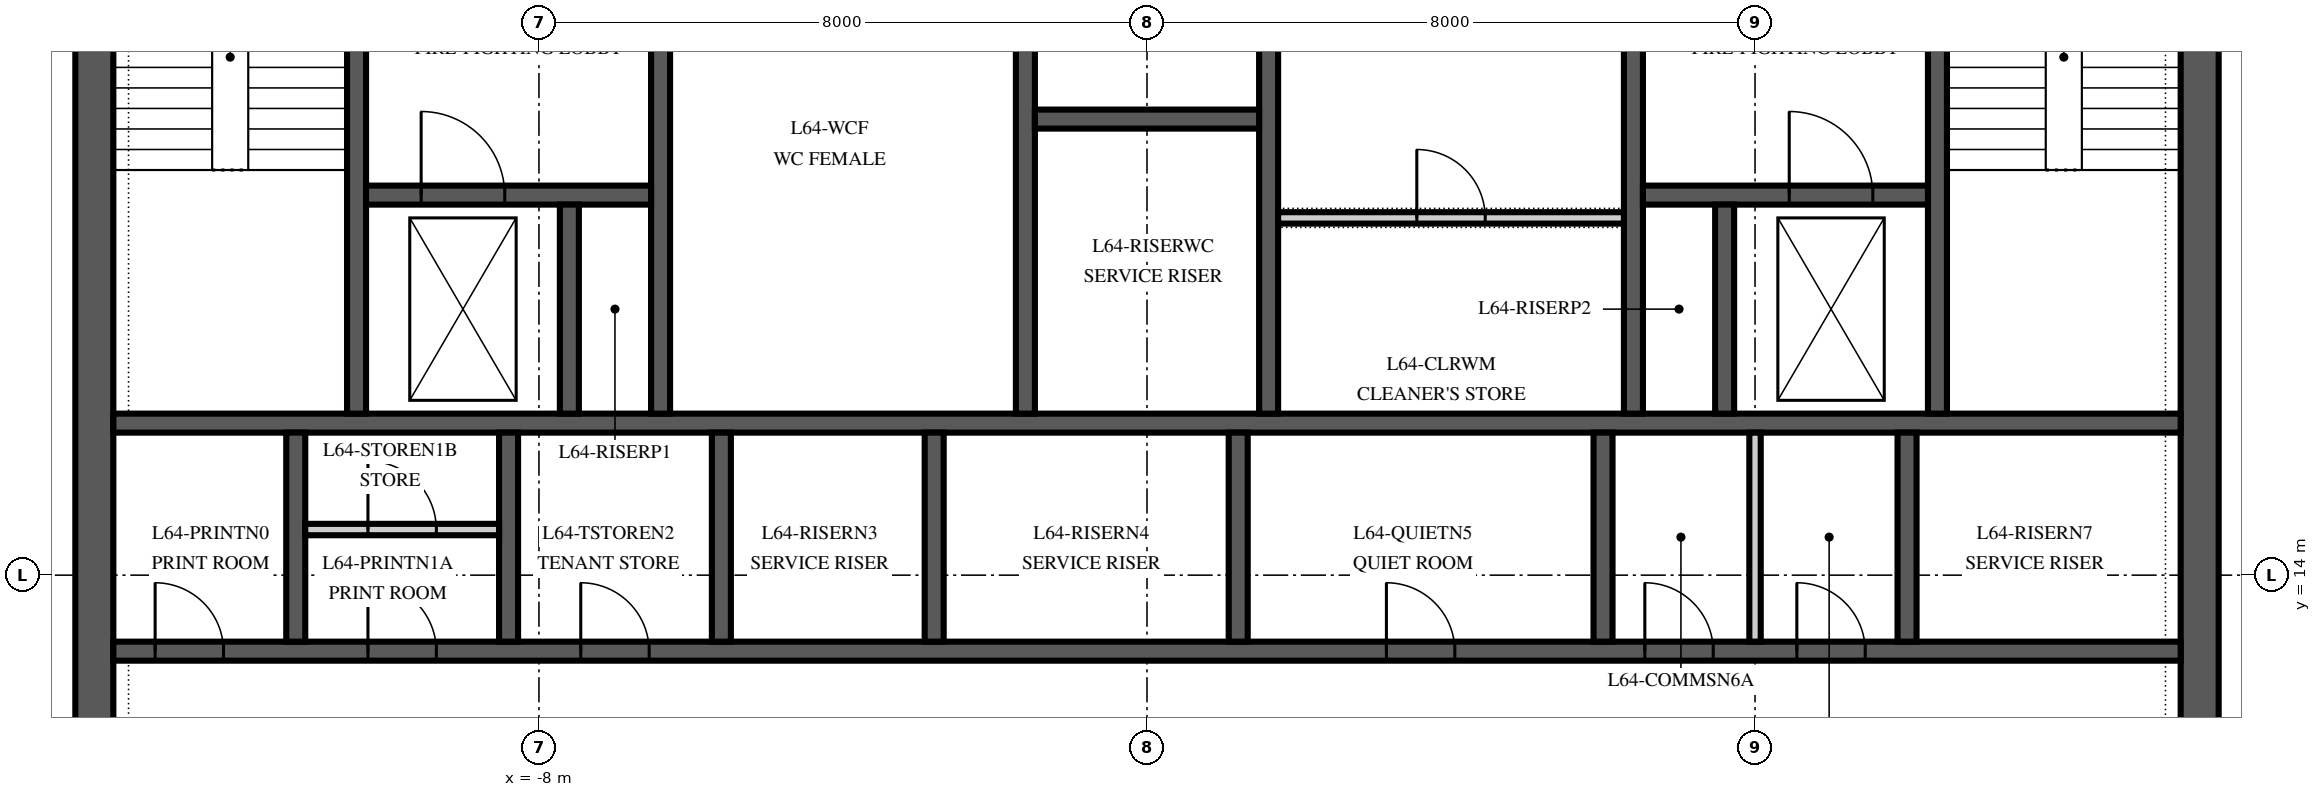
"""IFC4 building model, lengths in metres.
Left out: names, types, materials, properties, quantities, classifications, styles, units other than length and angle.
Written with IfcOpenShell. Run it as: python <this file> out.ifc"""

import sys

from ifc_helpers import new_model, si_unit, direction, frame, frame_2d, origin, place, context, subcontext, project, spatial, polyline, rectangle, outline, extrude, element, fill, save


model = new_model("IFC4")
c1 = context("Model", 3, precision=1e-05, world=origin(), true_north=direction((0.0, 1.0)))
c2 = subcontext(c1, "Body", "Model", "MODEL_VIEW")
j1 = project(units=[si_unit("LENGTHUNIT", "METRE"), si_unit("PLANEANGLEUNIT", "RADIAN")], contexts=[c1])
p1 = place(None, origin())
s1 = spatial("IfcSite", under=j1, at=p1, CompositionType="ELEMENT")
p2 = place(p1, origin())
s2 = spatial("IfcBuilding", under=s1, at=p2, CompositionType="ELEMENT")
p3 = place(p2, frame((0.0, 0.0, 276.0)))
s3 = spatial("IfcBuildingStorey", under=s2, at=p3, CompositionType="ELEMENT", Elevation=276.0)
p4 = place(p3, frame((13.85, 6.15, 0.0), z_axis=(0.0, 0.0, 1.0), x_axis=(0.0, 1.0, 0.0)))
e1 = element("IfcWall", 1, at=p4, inside=s3, PredefinedType="SHEAR", context=c2, shape_type="SweptSolid", body=[
    extrude(outline(polyline([(0.0, -0.25), (17.7, -0.25), (17.7, 0.0), (17.45, 0.0), (17.45, 0.25), (0.25, 0.25), (0.25, 0.0), (0.0, 0.0), (0.0, -0.25)])), origin(), (0.0, 0.0, 1.0), 4.0),
])
p5 = place(p4, frame((4.15, 0.0, 0.0)))
e2 = element("IfcOpeningElement", 2, at=p5, cuts=e1, PredefinedType="OPENING", context=c2, shape_type="SweptSolid", body=[
    extrude(rectangle(XDim=1.8, YDim=2.4, at=frame_2d((0.9, 1.2))), frame((0.0, 0.265, 0.0), z_axis=(0.0, -1.0, 0.0), x_axis=(1.0, 0.0, 0.0)), (0.0, 0.0, 1.0), 0.53),
])
p6 = place(p3, frame((-13.85, 23.85, 0.0), z_axis=(0.0, 0.0, 1.0), x_axis=(0.0, -1.0, 0.0)))
e3 = element("IfcWall", 3, at=p6, inside=s3, PredefinedType="SHEAR", context=c2, shape_type="SweptSolid", body=[
    extrude(outline(polyline([(0.0, -0.25), (17.7, -0.25), (17.7, 0.0), (17.45, 0.0), (17.45, 0.25), (0.25, 0.25), (0.25, 0.0), (0.0, 0.0), (0.0, -0.25)])), origin(), (0.0, 0.0, 1.0), 4.0),
])
p7 = place(p6, frame((11.75, 0.0, 0.0)))
e4 = element("IfcOpeningElement", 4, at=p7, cuts=e3, PredefinedType="OPENING", context=c2, shape_type="SweptSolid", body=[
    extrude(rectangle(XDim=1.8, YDim=2.4, at=frame_2d((0.9, 1.2))), frame((0.0, 0.265, 0.0), z_axis=(0.0, -1.0, 0.0), x_axis=(1.0, 0.0, 0.0)), (0.0, 0.0, 1.0), 0.53),
])
p8 = place(p3, frame((-13.6, 13.0, 0.0), z_axis=(0.0, 0.0, 1.0), x_axis=(1.0, 0.0, 0.0)))
e5 = element("IfcWall", 5, at=p8, inside=s3, PredefinedType="SHEAR", context=c2, shape_type="SweptSolid", body=[
    extrude(rectangle(XDim=27.2, YDim=0.25, at=frame_2d((13.6, 0.0))), origin(), (0.0, 0.0, 1.0), 4.0),
])
p9 = place(p8, frame((16.75, 0.0, 0.0)))
e6 = element("IfcOpeningElement", 6, at=p9, cuts=e5, PredefinedType="OPENING", context=c2, shape_type="SweptSolid", body=[
    extrude(rectangle(XDim=0.9, YDim=2.1, at=frame_2d((0.45, 1.05))), frame((0.0, 0.14, 0.0), z_axis=(0.0, -1.0, 0.0), x_axis=(1.0, 0.0, 0.0)), (0.0, 0.0, 1.0), 0.28),
])
p10 = place(p8, frame((20.15, 0.0, 0.0)))
e7 = element("IfcOpeningElement", 7, at=p10, cuts=e5, PredefinedType="OPENING", context=c2, shape_type="SweptSolid", body=[
    extrude(rectangle(XDim=0.9, YDim=2.1, at=frame_2d((0.45, 1.05))), frame((0.0, 0.14, 0.0), z_axis=(0.0, -1.0, 0.0), x_axis=(1.0, 0.0, 0.0)), (0.0, 0.0, 1.0), 0.28),
])
p11 = place(p8, frame((22.15, 0.0, 0.0)))
e8 = element("IfcOpeningElement", 8, at=p11, cuts=e5, PredefinedType="OPENING", context=c2, shape_type="SweptSolid", body=[
    extrude(rectangle(XDim=0.9, YDim=2.1, at=frame_2d((0.45, 1.05))), frame((0.0, 0.14, 0.0), z_axis=(0.0, -1.0, 0.0), x_axis=(1.0, 0.0, 0.0)), (0.0, 0.0, 1.0), 0.28),
])
p12 = place(p8, frame((0.55, 0.0, 0.0)))
e9 = element("IfcOpeningElement", 9, at=p12, cuts=e5, PredefinedType="OPENING", context=c2, shape_type="SweptSolid", body=[
    extrude(rectangle(XDim=0.9, YDim=2.1, at=frame_2d((0.45, 1.05))), frame((0.0, 0.14, 0.0), z_axis=(0.0, -1.0, 0.0), x_axis=(1.0, 0.0, 0.0)), (0.0, 0.0, 1.0), 0.28),
])
p13 = place(p8, frame((3.35, 0.0, 0.0)))
e10 = element("IfcOpeningElement", 10, at=p13, cuts=e5, PredefinedType="OPENING", context=c2, shape_type="SweptSolid", body=[
    extrude(rectangle(XDim=0.9, YDim=2.1, at=frame_2d((0.45, 1.05))), frame((0.0, 0.14, 0.0), z_axis=(0.0, -1.0, 0.0), x_axis=(1.0, 0.0, 0.0)), (0.0, 0.0, 1.0), 0.28),
])
p14 = place(p8, frame((6.15, 0.0, 0.0)))
e11 = element("IfcOpeningElement", 11, at=p14, cuts=e5, PredefinedType="OPENING", context=c2, shape_type="SweptSolid", body=[
    extrude(rectangle(XDim=0.9, YDim=2.1, at=frame_2d((0.45, 1.05))), frame((0.0, 0.14, 0.0), z_axis=(0.0, -1.0, 0.0), x_axis=(1.0, 0.0, 0.0)), (0.0, 0.0, 1.0), 0.28),
])
p15 = place(p3, frame((-13.6, 16.0, 0.0), z_axis=(0.0, 0.0, 1.0), x_axis=(1.0, 0.0, 0.0)))
e12 = element("IfcWall", 12, at=p15, inside=s3, PredefinedType="SHEAR", context=c2, shape_type="SweptSolid", body=[
    extrude(rectangle(XDim=27.2, YDim=0.25, at=frame_2d((13.6, 0.0))), origin(), (0.0, 0.0, 1.0), 4.0),
])
for number, where, z_axis, x_axis in (
    (13, (-11.2, 13.125, 0.0), (0.0, 0.0, 1.0), (0.0, 1.0, 0.0)),
    (14, (-8.4, 13.125, 0.0), (0.0, 0.0, 1.0), (0.0, 1.0, 0.0)),
    (15, (-5.6, 13.125, 0.0), (0.0, 0.0, 1.0), (0.0, 1.0, 0.0)),
    (16, (-2.8, 13.125, 0.0), (0.0, 0.0, 1.0), (0.0, 1.0, 0.0)),
    (17, (1.2, 13.125, 0.0), (0.0, 0.0, 1.0), (0.0, 1.0, 0.0)),
    (18, (6.0, 13.125, 0.0), (0.0, 0.0, 1.0), (0.0, 1.0, 0.0)),
    (19, (10.0, 13.125, 0.0), (0.0, 0.0, 1.0), (0.0, 1.0, 0.0)),
):
    element("IfcWall", number, at=place(p3, frame(where, z_axis=z_axis, x_axis=x_axis)), inside=s3, PredefinedType="SHEAR", context=c2, shape_type="SweptSolid", body=[
        extrude(rectangle(XDim=2.75, YDim=0.25, at=frame_2d((1.375, 0.0))), origin(), (0.0, 0.0, 1.0), 4.0),
    ])
p16 = place(p3, frame((-10.4, 16.125, 0.0), z_axis=(0.0, 0.0, 1.0), x_axis=(0.0, 1.0, 0.0)))
e20 = element("IfcWall", 20, at=p16, inside=s3, PredefinedType="SHEAR", context=c2, shape_type="SweptSolid", body=[
    extrude(rectangle(XDim=7.475, YDim=0.25, at=frame_2d((3.738, 0.0))), origin(), (0.0, 0.0, 1.0), 4.0),
])
p17 = place(p16, frame((6.275, 0.0, 0.0)))
e21 = element("IfcOpeningElement", 21, at=p17, cuts=e20, PredefinedType="OPENING", context=c2, shape_type="SweptSolid", body=[
    extrude(rectangle(XDim=1.0, YDim=2.1, at=frame_2d((0.5, 1.05))), frame((0.0, 0.14, 0.0), z_axis=(0.0, -1.0, 0.0), x_axis=(1.0, 0.0, 0.0)), (0.0, 0.0, 1.0), 0.28),
])
for number, where, z_axis, x_axis in (
    (22, (-6.4, 16.125, 0.0), (0.0, 0.0, 1.0), (0.0, 1.0, 0.0)),
    (23, (-1.6, 16.125, 0.0), (0.0, 0.0, 1.0), (0.0, 1.0, 0.0)),
    (24, (1.6, 16.125, 0.0), (0.0, 0.0, 1.0), (0.0, 1.0, 0.0)),
    (25, (6.4, 16.125, 0.0), (0.0, 0.0, 1.0), (0.0, 1.0, 0.0)),
):
    element("IfcWall", number, at=place(p3, frame(where, z_axis=z_axis, x_axis=x_axis)), inside=s3, PredefinedType="SHEAR", context=c2, shape_type="SweptSolid", body=[
        extrude(rectangle(XDim=7.475, YDim=0.25, at=frame_2d((3.738, 0.0))), origin(), (0.0, 0.0, 1.0), 4.0),
    ])
p18 = place(p3, frame((10.4, 16.125, 0.0), z_axis=(0.0, 0.0, 1.0), x_axis=(0.0, 1.0, 0.0)))
e26 = element("IfcWall", 26, at=p18, inside=s3, PredefinedType="SHEAR", context=c2, shape_type="SweptSolid", body=[
    extrude(rectangle(XDim=7.475, YDim=0.25, at=frame_2d((3.738, 0.0))), origin(), (0.0, 0.0, 1.0), 4.0),
])
p19 = place(p18, frame((6.275, 0.0, 0.0)))
e27 = element("IfcOpeningElement", 27, at=p19, cuts=e26, PredefinedType="OPENING", context=c2, shape_type="SweptSolid", body=[
    extrude(rectangle(XDim=1.0, YDim=2.1, at=frame_2d((0.5, 1.05))), frame((0.0, 0.14, 0.0), z_axis=(0.0, -1.0, 0.0), x_axis=(1.0, 0.0, 0.0)), (0.0, 0.0, 1.0), 0.28),
])
p20 = place(p3, frame((-10.275, 19.0, 0.0), z_axis=(0.0, 0.0, 1.0), x_axis=(1.0, 0.0, 0.0)))
e28 = element("IfcWall", 28, at=p20, inside=s3, PredefinedType="SHEAR", context=c2, shape_type="SweptSolid", body=[
    extrude(rectangle(XDim=3.75, YDim=0.25, at=frame_2d((1.875, 0.0))), origin(), (0.0, 0.0, 1.0), 4.0),
])
p21 = place(p20, frame((0.725, 0.0, 0.0)))
e29 = element("IfcOpeningElement", 29, at=p21, cuts=e28, PredefinedType="OPENING", context=c2, shape_type="SweptSolid", body=[
    extrude(rectangle(XDim=1.1, YDim=2.1, at=frame_2d((0.55, 1.05))), frame((0.0, 0.14, 0.0), z_axis=(0.0, -1.0, 0.0), x_axis=(1.0, 0.0, 0.0)), (0.0, 0.0, 1.0), 0.28),
])
p22 = place(p3, frame((6.525, 19.0, 0.0), z_axis=(0.0, 0.0, 1.0), x_axis=(1.0, 0.0, 0.0)))
e30 = element("IfcWall", 30, at=p22, inside=s3, PredefinedType="SHEAR", context=c2, shape_type="SweptSolid", body=[
    extrude(rectangle(XDim=3.75, YDim=0.25, at=frame_2d((1.875, 0.0))), origin(), (0.0, 0.0, 1.0), 4.0),
])
p23 = place(p22, frame((1.925, 0.0, 0.0)))
e31 = element("IfcOpeningElement", 31, at=p23, cuts=e30, PredefinedType="OPENING", context=c2, shape_type="SweptSolid", body=[
    extrude(rectangle(XDim=1.1, YDim=2.1, at=frame_2d((0.55, 1.05))), frame((0.0, 0.14, 0.0), z_axis=(0.0, -1.0, 0.0), x_axis=(1.0, 0.0, 0.0)), (0.0, 0.0, 1.0), 0.28),
])
for number, where, z_axis, x_axis in (
    (32, (-7.6, 16.125, 0.0), (0.0, 0.0, 1.0), (0.0, 1.0, 0.0)),
    (33, (7.6, 16.125, 0.0), (0.0, 0.0, 1.0), (0.0, 1.0, 0.0)),
):
    element("IfcWall", number, at=place(p3, frame(where, z_axis=z_axis, x_axis=x_axis)), inside=s3, PredefinedType="SHEAR", context=c2, shape_type="SweptSolid", body=[
        extrude(rectangle(XDim=2.75, YDim=0.25, at=frame_2d((1.375, 0.0))), origin(), (0.0, 0.0, 1.0), 4.0),
    ])
p24 = place(p3, frame((-1.475, 20.0, 0.0), z_axis=(0.0, 0.0, 1.0), x_axis=(1.0, 0.0, 0.0)))
e34 = element("IfcWall", 34, at=p24, inside=s3, PredefinedType="SHEAR", context=c2, shape_type="SweptSolid", body=[
    extrude(rectangle(XDim=2.95, YDim=0.25, at=frame_2d((1.475, 0.0))), origin(), (0.0, 0.0, 1.0), 4.0),
])
p25 = place(p3, frame((1.725, 18.7, 0.0), z_axis=(0.0, 0.0, 1.0), x_axis=(1.0, 0.0, 0.0)))
e35 = element("IfcWall", 35, at=p25, inside=s3, PredefinedType="PARTITIONING", context=c2, shape_type="SweptSolid", body=[
    extrude(rectangle(XDim=4.55, YDim=0.15, at=frame_2d((2.275, 0.0))), origin(), (0.0, 0.0, 1.0), 3.85),
])
p26 = place(p25, frame((1.825, 0.0, 0.0)))
e36 = element("IfcOpeningElement", 36, at=p26, cuts=e35, PredefinedType="OPENING", context=c2, shape_type="SweptSolid", body=[
    extrude(rectangle(XDim=0.9, YDim=2.1, at=frame_2d((0.45, 1.05))), frame((0.0, 0.09, 0.0), z_axis=(0.0, -1.0, 0.0), x_axis=(1.0, 0.0, 0.0)), (0.0, 0.0, 1.0), 0.18),
])
p27 = place(p3, frame((8.0, 13.125, 0.0), z_axis=(0.0, 0.0, 1.0), x_axis=(0.0, 1.0, 0.0)))
e37 = element("IfcWall", 37, at=p27, inside=s3, PredefinedType="PARTITIONING", context=c2, shape_type="SweptSolid", body=[
    extrude(rectangle(XDim=2.75, YDim=0.15, at=frame_2d((1.375, 0.0))), origin(), (0.0, 0.0, 1.0), 3.85),
])
p28 = place(p3, frame((-11.075, 14.6, 0.0), z_axis=(0.0, 0.0, 1.0), x_axis=(1.0, 0.0, 0.0)))
e38 = element("IfcWall", 38, at=p28, inside=s3, PredefinedType="PARTITIONING", context=c2, shape_type="SweptSolid", body=[
    extrude(rectangle(XDim=2.55, YDim=0.15, at=frame_2d((1.275, 0.0))), origin(), (0.0, 0.0, 1.0), 3.85),
])
p29 = place(p28, frame((0.825, 0.0, 0.0)))
e39 = element("IfcOpeningElement", 39, at=p29, cuts=e38, PredefinedType="OPENING", context=c2, shape_type="SweptSolid", body=[
    extrude(rectangle(XDim=0.9, YDim=2.1, at=frame_2d((0.45, 1.05))), frame((0.0, 0.09, 0.0), z_axis=(0.0, -1.0, 0.0), x_axis=(1.0, 0.0, 0.0)), (0.0, 0.0, 1.0), 0.18),
])
p30 = place(p23, origin())
e40 = element("IfcDoor", 40, at=p30, inside=s3, OperationType="SLIDING_TO_RIGHT", PredefinedType="DOOR", context=c2, shape_type="SweptSolid", body=[
    extrude(rectangle(XDim=1.1, YDim=2.1, at=frame_2d((0.55, 1.05))), frame((0.0, 0.125, 0.0), z_axis=(0.0, -1.0, 0.0), x_axis=(1.0, 0.0, 0.0)), (0.0, 0.0, 1.0), 0.25),
])
fill(e31, e40)
p31 = place(p21, origin())
e41 = element("IfcDoor", 41, at=p31, inside=s3, OperationType="SLIDING_TO_RIGHT", PredefinedType="DOOR", context=c2, shape_type="SweptSolid", body=[
    extrude(rectangle(XDim=1.1, YDim=2.1, at=frame_2d((0.55, 1.05))), frame((0.0, 0.125, 0.0), z_axis=(0.0, -1.0, 0.0), x_axis=(1.0, 0.0, 0.0)), (0.0, 0.0, 1.0), 0.25),
])
fill(e29, e41)
p32 = place(p9, origin())
e42 = element("IfcDoor", 42, at=p32, inside=s3, OperationType="SINGLE_SWING_LEFT", PredefinedType="DOOR", context=c2, shape_type="SweptSolid", body=[
    extrude(rectangle(XDim=0.9, YDim=2.1, at=frame_2d((0.45, 1.05))), frame((0.0, 0.125, 0.0), z_axis=(0.0, -1.0, 0.0), x_axis=(1.0, 0.0, 0.0)), (0.0, 0.0, 1.0), 0.25),
])
fill(e6, e42)
p33 = place(p10, origin())
e43 = element("IfcDoor", 43, at=p33, inside=s3, OperationType="SINGLE_SWING_LEFT", PredefinedType="DOOR", context=c2, shape_type="SweptSolid", body=[
    extrude(rectangle(XDim=0.9, YDim=2.1, at=frame_2d((0.45, 1.05))), frame((0.0, 0.125, 0.0), z_axis=(0.0, -1.0, 0.0), x_axis=(1.0, 0.0, 0.0)), (0.0, 0.0, 1.0), 0.25),
])
fill(e7, e43)
p34 = place(p11, origin())
e44 = element("IfcDoor", 44, at=p34, inside=s3, OperationType="SINGLE_SWING_LEFT", PredefinedType="DOOR", context=c2, shape_type="SweptSolid", body=[
    extrude(rectangle(XDim=0.9, YDim=2.1, at=frame_2d((0.45, 1.05))), frame((0.0, 0.125, 0.0), z_axis=(0.0, -1.0, 0.0), x_axis=(1.0, 0.0, 0.0)), (0.0, 0.0, 1.0), 0.25),
])
fill(e8, e44)
p35 = place(p12, origin())
e45 = element("IfcDoor", 45, at=p35, inside=s3, OperationType="SINGLE_SWING_LEFT", PredefinedType="DOOR", context=c2, shape_type="SweptSolid", body=[
    extrude(rectangle(XDim=0.9, YDim=2.1, at=frame_2d((0.45, 1.05))), frame((0.0, 0.125, 0.0), z_axis=(0.0, -1.0, 0.0), x_axis=(1.0, 0.0, 0.0)), (0.0, 0.0, 1.0), 0.25),
])
fill(e9, e45)
p36 = place(p13, origin())
e46 = element("IfcDoor", 46, at=p36, inside=s3, OperationType="SINGLE_SWING_LEFT", PredefinedType="DOOR", context=c2, shape_type="SweptSolid", body=[
    extrude(rectangle(XDim=0.9, YDim=2.1, at=frame_2d((0.45, 1.05))), frame((0.0, 0.125, 0.0), z_axis=(0.0, -1.0, 0.0), x_axis=(1.0, 0.0, 0.0)), (0.0, 0.0, 1.0), 0.25),
])
fill(e10, e46)
p37 = place(p29, origin())
e47 = element("IfcDoor", 47, at=p37, inside=s3, OperationType="SINGLE_SWING_LEFT", PredefinedType="DOOR", context=c2, shape_type="SweptSolid", body=[
    extrude(rectangle(XDim=0.9, YDim=2.1, at=frame_2d((0.45, 1.05))), frame((0.0, 0.075, 0.0), z_axis=(0.0, -1.0, 0.0), x_axis=(1.0, 0.0, 0.0)), (0.0, 0.0, 1.0), 0.149),
])
fill(e39, e47)
p38 = place(p14, origin())
e48 = element("IfcDoor", 48, at=p38, inside=s3, OperationType="SINGLE_SWING_LEFT", PredefinedType="DOOR", context=c2, shape_type="SweptSolid", body=[
    extrude(rectangle(XDim=0.9, YDim=2.1, at=frame_2d((0.45, 1.05))), frame((0.0, 0.125, 0.0), z_axis=(0.0, -1.0, 0.0), x_axis=(1.0, 0.0, 0.0)), (0.0, 0.0, 1.0), 0.25),
])
fill(e11, e48)
p39 = place(p26, origin())
e49 = element("IfcDoor", 49, at=p39, inside=s3, OperationType="SINGLE_SWING_LEFT", PredefinedType="DOOR", context=c2, shape_type="SweptSolid", body=[
    extrude(rectangle(XDim=0.9, YDim=2.1, at=frame_2d((0.45, 1.05))), frame((0.0, 0.075, 0.0), z_axis=(0.0, -1.0, 0.0), x_axis=(1.0, 0.0, 0.0)), (0.0, 0.0, 1.0), 0.149),
])
fill(e36, e49)
save(model, sys.argv[1])
